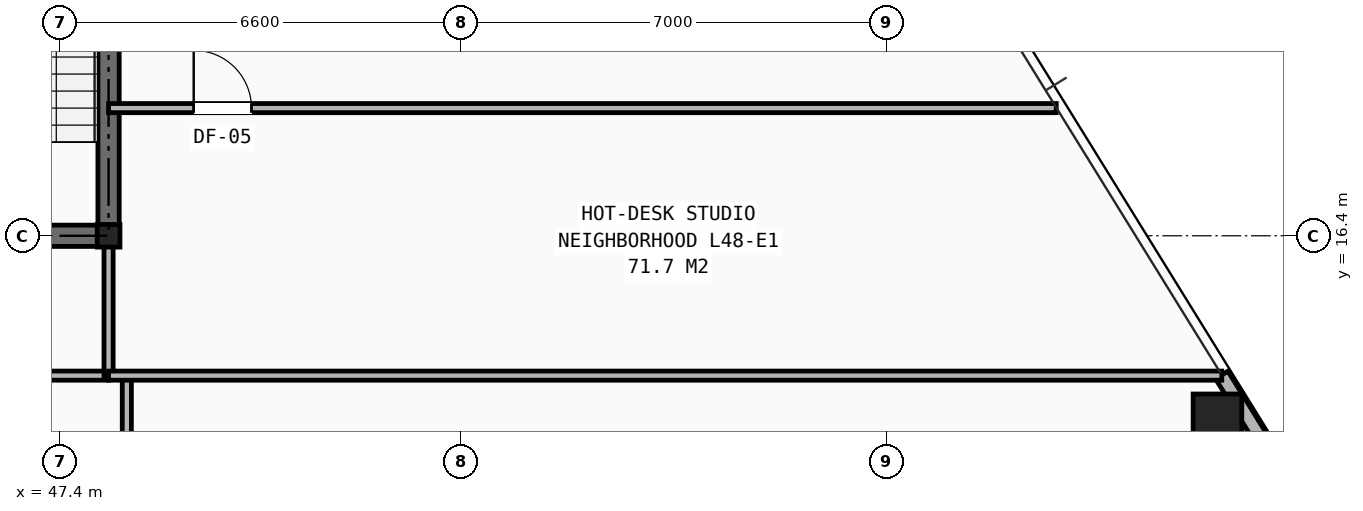
"""IFC4 building model, lengths in metres.
Left out: names, types, materials, properties, quantities, classifications, styles, units other than length and angle.
Written with IfcOpenShell. Run it as: python <this file> out.ifc"""

import sys

from ifc_helpers import new_model, si_unit, direction, frame, frame_2d, origin, origin_2d, place, context, subcontext, project, spatial, rectangle, hollow_rectangle, i_section, extrude, element, fill, save


model = new_model("IFC4")
c1 = context("Model", 3, precision=1e-05, world=origin(), true_north=direction((0.0, 1.0)))
c2 = subcontext(c1, "Body", "Model", "MODEL_VIEW")
j1 = project(units=[si_unit("LENGTHUNIT", "METRE"), si_unit("PLANEANGLEUNIT", "RADIAN")], contexts=[c1])
p1 = place(None, origin())
s1 = spatial("IfcSite", under=j1, at=p1, CompositionType="ELEMENT")
p2 = place(p1, origin())
s2 = spatial("IfcBuilding", under=s1, at=p2, CompositionType="ELEMENT")
p3 = place(p2, frame((0.0, 0.0, 168.9)))
s3 = spatial("IfcBuildingStorey", under=s2, at=p3, CompositionType="ELEMENT", Elevation=168.9)
p4 = place(p3, frame((48.2, 16.4, 0.0), z_axis=(0.0, 0.0, 1.0), x_axis=(1.0, 0.0, 0.0)))
e1 = element("IfcColumn", 1, at=p4, inside=s3, PredefinedType="COLUMN", context=c2, shape_type="SweptSolid", body=[
    extrude(i_section(OverallWidth=0.374, OverallDepth=0.372, WebThickness=0.016, FlangeThickness=0.026, at=origin_2d()), origin(), (0.0, 0.0, 1.0), 3.45),
])
p5 = place(p3, frame((66.436, 13.398, 0.0), z_axis=(0.0, 0.0, 1.0), x_axis=(1.0, 0.0, 0.0)))
e2 = element("IfcColumn", 2, at=p5, inside=s3, PredefinedType="COLUMN", context=c2, shape_type="SweptSolid", body=[
    extrude(hollow_rectangle(XDim=0.8, YDim=0.8, WallThickness=0.055, at=origin_2d()), origin(), (0.0, 0.0, 1.0), 3.45),
])
p6 = place(p3, frame((67.194, 13.001, 0.0), z_axis=(0.0, 0.0, 1.0), x_axis=(-0.526225760999, 0.850344899709, 0.0)))
e3 = element("IfcWall", 3, at=p6, inside=s3, PredefinedType="SHEAR", context=c2, shape_type="SweptSolid", body=[
    extrude(rectangle(XDim=1.305, YDim=0.24, at=frame_2d((0.652, 0.0))), origin(), (0.0, 0.0, 1.0), 2.583),
])
p7 = place(p3, frame((31.8, 16.4, 0.0), z_axis=(0.0, 0.0, 1.0), x_axis=(1.0, 0.0, 0.0)))
e4 = element("IfcWall", 4, at=p7, inside=s3, PredefinedType="SHEAR", context=c2, shape_type="SweptSolid", body=[
    extrude(rectangle(XDim=16.4, YDim=0.35, at=frame_2d((8.2, 0.0))), origin(), (0.0, 0.0, 1.0), 3.21),
])
p8 = place(p7, frame((4.2, 0.0, 0.0)))
e5 = element("IfcOpeningElement", 5, at=p8, cuts=e4, PredefinedType="OPENING", context=c2, shape_type="SweptSolid", body=[
    extrude(rectangle(XDim=0.95, YDim=2.1, at=frame_2d((0.475, 1.05))), frame((0.0, 0.185, 0.0), z_axis=(0.0, -1.0, 0.0), x_axis=(1.0, 0.0, 0.0)), (0.0, 0.0, 1.0), 0.37),
])
p9 = place(p7, frame((10.6, 0.0, 0.0)))
e6 = element("IfcOpeningElement", 6, at=p9, cuts=e4, PredefinedType="OPENING", context=c2, shape_type="SweptSolid", body=[
    extrude(rectangle(XDim=0.95, YDim=2.1, at=frame_2d((0.475, 1.05))), frame((0.0, 0.185, 0.0), z_axis=(0.0, -1.0, 0.0), x_axis=(1.0, 0.0, 0.0)), (0.0, 0.0, 1.0), 0.37),
])
p10 = place(p3, frame((48.2, 16.4, 0.0), z_axis=(0.0, 0.0, 1.0), x_axis=(0.0, 1.0, 0.0)))
e7 = element("IfcWall", 7, at=p10, inside=s3, PredefinedType="SHEAR", context=c2, shape_type="SweptSolid", body=[
    extrude(rectangle(XDim=14.8, YDim=0.35, at=frame_2d((7.4, 0.0))), origin(), (0.0, 0.0, 1.0), 3.21),
])
p11 = place(p10, frame((11.0, 0.0, 0.0)))
e8 = element("IfcOpeningElement", 8, at=p11, cuts=e7, PredefinedType="OPENING", context=c2, shape_type="SweptSolid", body=[
    extrude(rectangle(XDim=1.1, YDim=2.15, at=frame_2d((0.55, 1.075))), frame((0.0, 0.185, 0.0), z_axis=(0.0, -1.0, 0.0), x_axis=(1.0, 0.0, 0.0)), (0.0, 0.0, 1.0), 0.37),
])
p12 = place(p3, frame((29.6, 14.1, 0.0), z_axis=(0.0, 0.0, 1.0), x_axis=(1.0, 0.0, 0.0)))
e9 = element("IfcWall", 9, at=p12, inside=s3, PredefinedType="PARTITIONING", context=c2, shape_type="SweptSolid", body=[
    extrude(rectangle(XDim=18.6, YDim=0.15, at=frame_2d((9.3, 0.0))), origin(), (0.0, 0.0, 1.0), 2.225),
])
p13 = place(p12, frame((0.55, 0.0, 0.0)))
e10 = element("IfcOpeningElement", 10, at=p13, cuts=e9, PredefinedType="OPENING", context=c2, shape_type="SweptSolid", body=[
    extrude(rectangle(XDim=0.95, YDim=2.1, at=frame_2d((0.475, 1.05))), frame((0.0, 0.085, 0.0), z_axis=(0.0, -1.0, 0.0), x_axis=(1.0, 0.0, 0.0)), (0.0, 0.0, 1.0), 0.17),
])
p14 = place(p12, frame((2.25, 0.0, 0.0)))
e11 = element("IfcOpeningElement", 11, at=p14, cuts=e9, PredefinedType="OPENING", context=c2, shape_type="SweptSolid", body=[
    extrude(rectangle(XDim=0.95, YDim=2.1, at=frame_2d((0.475, 1.05))), frame((0.0, 0.085, 0.0), z_axis=(0.0, -1.0, 0.0), x_axis=(1.0, 0.0, 0.0)), (0.0, 0.0, 1.0), 0.17),
])
p15 = place(p12, frame((6.55, 0.0, 0.0)))
e12 = element("IfcOpeningElement", 12, at=p15, cuts=e9, PredefinedType="OPENING", context=c2, shape_type="SweptSolid", body=[
    extrude(rectangle(XDim=0.95, YDim=2.1, at=frame_2d((0.475, 1.05))), frame((0.0, 0.085, 0.0), z_axis=(0.0, -1.0, 0.0), x_axis=(1.0, 0.0, 0.0)), (0.0, 0.0, 1.0), 0.17),
])
p16 = place(p12, frame((10.75, 0.0, 0.0)))
e13 = element("IfcOpeningElement", 13, at=p16, cuts=e9, PredefinedType="OPENING", context=c2, shape_type="SweptSolid", body=[
    extrude(rectangle(XDim=0.95, YDim=2.1, at=frame_2d((0.475, 1.05))), frame((0.0, 0.085, 0.0), z_axis=(0.0, -1.0, 0.0), x_axis=(1.0, 0.0, 0.0)), (0.0, 0.0, 1.0), 0.17),
])
p17 = place(p12, frame((14.95, 0.0, 0.0)))
e14 = element("IfcOpeningElement", 14, at=p17, cuts=e9, PredefinedType="OPENING", context=c2, shape_type="SweptSolid", body=[
    extrude(rectangle(XDim=0.95, YDim=2.1, at=frame_2d((0.475, 1.05))), frame((0.0, 0.085, 0.0), z_axis=(0.0, -1.0, 0.0), x_axis=(1.0, 0.0, 0.0)), (0.0, 0.0, 1.0), 0.17),
])
p18 = place(p3, frame((48.2, 14.1, 0.0), z_axis=(0.0, 0.0, 1.0), x_axis=(0.0, 1.0, 0.0)))
e15 = element("IfcWall", 15, at=p18, inside=s3, PredefinedType="PARTITIONING", context=c2, shape_type="SweptSolid", body=[
    extrude(rectangle(XDim=2.3, YDim=0.15, at=frame_2d((1.15, 0.0))), origin(), (0.0, 0.0, 1.0), 2.665),
])
p19 = place(p3, frame((48.5, 6.706, 0.0), z_axis=(0.0, 0.0, 1.0), x_axis=(0.0, 1.0, 0.0)))
e16 = element("IfcWall", 16, at=p19, inside=s3, PredefinedType="PARTITIONING", context=c2, shape_type="SweptSolid", body=[
    extrude(rectangle(XDim=7.394, YDim=0.15, at=frame_2d((3.697, 0.0))), origin(), (0.0, 0.0, 1.0), 2.589),
])
p20 = place(p3, frame((48.2, 14.1, 0.0), z_axis=(0.0, 0.0, 1.0), x_axis=(1.0, 0.0, 0.0)))
e17 = element("IfcWall", 17, at=p20, inside=s3, PredefinedType="PARTITIONING", context=c2, shape_type="SweptSolid", body=[
    extrude(rectangle(XDim=18.308, YDim=0.15, at=frame_2d((9.154, 0.0))), origin(), (0.0, 0.0, 1.0), 2.589),
])
p21 = place(p3, frame((48.2, 18.5, 0.0), z_axis=(0.0, 0.0, 1.0), x_axis=(1.0, 0.0, 0.0)))
e18 = element("IfcWall", 18, at=p21, inside=s3, PredefinedType="PARTITIONING", context=c2, shape_type="SweptSolid", body=[
    extrude(rectangle(XDim=15.585, YDim=0.15, at=frame_2d((7.792, 0.0))), origin(), (0.0, 0.0, 1.0), 2.589),
])
p22 = place(p21, frame((1.4, 0.0, 0.0)))
e19 = element("IfcOpeningElement", 19, at=p22, cuts=e18, PredefinedType="OPENING", context=c2, shape_type="SweptSolid", body=[
    extrude(rectangle(XDim=0.95, YDim=2.1, at=frame_2d((0.475, 1.05))), frame((0.0, 0.085, 0.0), z_axis=(0.0, -1.0, 0.0), x_axis=(1.0, 0.0, 0.0)), (0.0, 0.0, 1.0), 0.17),
])
p23 = place(p22, origin())
e20 = element("IfcDoor", 20, at=p23, inside=s3, OperationType="SINGLE_SWING_LEFT", PredefinedType="DOOR", context=c2, shape_type="SweptSolid", body=[
    extrude(rectangle(XDim=0.95, YDim=2.1, at=frame_2d((0.475, 1.05))), frame((0.0, 0.025, 0.0), z_axis=(0.0, -1.0, 0.0), x_axis=(1.0, 0.0, 0.0)), (0.0, 0.0, 1.0), 0.05),
])
fill(e19, e20)
save(model, sys.argv[1])
